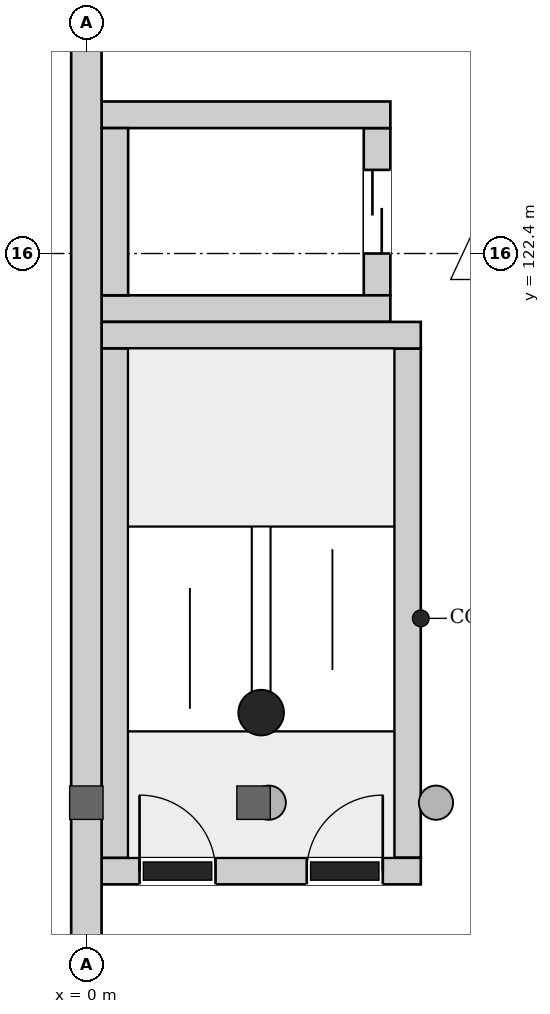
"""IFC4 building model, lengths in metres.
Left out: names, types, materials, properties, quantities, classifications, styles, units other than length and angle.
Written with IfcOpenShell. Run it as: python <this file> out.ifc"""

import sys

from ifc_helpers import new_model, si_unit, direction, frame, frame_2d, origin, place, context, subcontext, project, spatial, rectangle, extrude, element, fill, save


model = new_model("IFC4")
c1 = context("Model", 3, precision=1e-05, world=origin(), true_north=direction((0.0, 1.0)))
c2 = subcontext(c1, "Body", "Model", "MODEL_VIEW")
j1 = project(units=[si_unit("LENGTHUNIT", "METRE"), si_unit("PLANEANGLEUNIT", "RADIAN")], contexts=[c1])
p1 = place(None, origin())
s1 = spatial("IfcSite", under=j1, at=p1, CompositionType="ELEMENT")
p2 = place(p1, origin())
s2 = spatial("IfcBuilding", under=s1, at=p2, CompositionType="ELEMENT")
p3 = place(p2, frame((0.0, 0.0, 26.7)))
s3 = spatial("IfcBuildingStorey", under=s2, at=p3, CompositionType="ELEMENT", Elevation=26.7)
p4 = place(p3, frame((0.0, 94.12, 0.0), z_axis=(0.0, 0.0, 1.0), x_axis=(0.0, 1.0, 0.0)))
e1 = element("IfcWall", 1, at=p4, inside=s3, PredefinedType="SHEAR", context=c2, shape_type="SweptSolid", body=[
    extrude(rectangle(XDim=46.88, YDim=0.4, at=frame_2d((23.44, 0.0))), origin(), (0.0, 0.0, 1.0), 5.2),
])
p5 = place(p3, frame((0.2, 114.275, 0.0), z_axis=(0.0, 0.0, 1.0), x_axis=(1.0, 0.0, 0.0)))
e2 = element("IfcWall", 2, at=p5, inside=s3, PredefinedType="SHEAR", context=c2, shape_type="SweptSolid", body=[
    extrude(rectangle(XDim=4.2, YDim=0.35, at=frame_2d((2.1, 0.0))), origin(), (0.0, 0.0, 1.0), 5.2),
])
p6 = place(p5, frame((0.5, 0.0, 0.0)))
e3 = element("IfcOpeningElement", 3, at=p6, cuts=e2, PredefinedType="OPENING", context=c2, shape_type="SweptSolid", body=[
    extrude(rectangle(XDim=1.0, YDim=2.1, at=frame_2d((0.5, 1.05))), frame((0.0, 0.185, 0.0), z_axis=(0.0, -1.0, 0.0), x_axis=(1.0, 0.0, 0.0)), (0.0, 0.0, 1.0), 0.37),
])
p7 = place(p5, frame((2.7, 0.0, 0.0)))
e4 = element("IfcOpeningElement", 4, at=p7, cuts=e2, PredefinedType="OPENING", context=c2, shape_type="SweptSolid", body=[
    extrude(rectangle(XDim=1.0, YDim=2.1, at=frame_2d((0.5, 1.05))), frame((0.0, 0.185, 0.0), z_axis=(0.0, -1.0, 0.0), x_axis=(1.0, 0.0, 0.0)), (0.0, 0.0, 1.0), 0.37),
])
p8 = place(p3, frame((0.2, 121.325, 0.0), z_axis=(0.0, 0.0, 1.0), x_axis=(1.0, 0.0, 0.0)))
e5 = element("IfcWall", 5, at=p8, inside=s3, PredefinedType="SHEAR", context=c2, shape_type="SweptSolid", body=[
    extrude(rectangle(XDim=4.2, YDim=0.35, at=frame_2d((2.1, 0.0))), origin(), (0.0, 0.0, 1.0), 5.2),
])
for number, where, z_axis, x_axis in (
    (6, (0.375, 114.45, 0.0), (0.0, 0.0, 1.0), (0.0, 1.0, 0.0)),
    (7, (4.225, 114.45, 0.0), (0.0, 0.0, 1.0), (0.0, 1.0, 0.0)),
):
    element("IfcWall", number, at=place(p3, frame(where, z_axis=z_axis, x_axis=x_axis)), inside=s3, PredefinedType="SHEAR", context=c2, shape_type="SweptSolid", body=[
        extrude(rectangle(XDim=6.7, YDim=0.35, at=frame_2d((3.35, 0.0))), origin(), (0.0, 0.0, 1.0), 5.2),
    ])
for number, where, z_axis, x_axis in (
    (8, (0.2, 121.675, 0.0), (0.0, 0.0, 1.0), (1.0, 0.0, 0.0)),
    (9, (0.2, 124.225, 0.0), (0.0, 0.0, 1.0), (1.0, 0.0, 0.0)),
):
    element("IfcWall", number, at=place(p3, frame(where, z_axis=z_axis, x_axis=x_axis)), inside=s3, PredefinedType="SHEAR", context=c2, shape_type="SweptSolid", body=[
        extrude(rectangle(XDim=3.8, YDim=0.35, at=frame_2d((1.9, 0.0))), origin(), (0.0, 0.0, 1.0), 5.2),
    ])
p9 = place(p3, frame((0.375, 121.85, 0.0), z_axis=(0.0, 0.0, 1.0), x_axis=(0.0, 1.0, 0.0)))
e10 = element("IfcWall", 10, at=p9, inside=s3, PredefinedType="SHEAR", context=c2, shape_type="SweptSolid", body=[
    extrude(rectangle(XDim=2.2, YDim=0.35, at=frame_2d((1.1, 0.0))), origin(), (0.0, 0.0, 1.0), 5.2),
])
p10 = place(p3, frame((3.825, 121.85, 0.0), z_axis=(0.0, 0.0, 1.0), x_axis=(0.0, 1.0, 0.0)))
e11 = element("IfcWall", 11, at=p10, inside=s3, PredefinedType="SHEAR", context=c2, shape_type="SweptSolid", body=[
    extrude(rectangle(XDim=2.2, YDim=0.35, at=frame_2d((1.1, 0.0))), origin(), (0.0, 0.0, 1.0), 5.2),
])
p11 = place(p10, frame((0.55, 0.0, 0.0)))
e12 = element("IfcOpeningElement", 12, at=p11, cuts=e11, PredefinedType="OPENING", context=c2, shape_type="SweptSolid", body=[
    extrude(rectangle(XDim=1.1, YDim=2.1, at=frame_2d((0.55, 1.05))), frame((0.0, 0.185, 0.0), z_axis=(0.0, -1.0, 0.0), x_axis=(1.0, 0.0, 0.0)), (0.0, 0.0, 1.0), 0.37),
])
p12 = place(p6, origin())
e13 = element("IfcDoor", 13, at=p12, inside=s3, OperationType="SINGLE_SWING_RIGHT", PredefinedType="DOOR", context=c2, shape_type="SweptSolid", body=[
    extrude(rectangle(XDim=1.0, YDim=2.1, at=frame_2d((0.5, 1.05))), frame((0.0, 0.025, 0.0), z_axis=(0.0, -1.0, 0.0), x_axis=(1.0, 0.0, 0.0)), (0.0, 0.0, 1.0), 0.05),
])
fill(e3, e13)
p13 = place(p7, origin())
e14 = element("IfcDoor", 14, at=p13, inside=s3, OperationType="SINGLE_SWING_LEFT", PredefinedType="DOOR", context=c2, shape_type="SweptSolid", body=[
    extrude(rectangle(XDim=1.0, YDim=2.1, at=frame_2d((0.5, 1.05))), frame((0.0, 0.025, 0.0), z_axis=(0.0, -1.0, 0.0), x_axis=(1.0, 0.0, 0.0)), (0.0, 0.0, 1.0), 0.05),
])
fill(e4, e14)
p14 = place(p11, origin())
e15 = element("IfcDoor", 15, at=p14, inside=s3, OperationType="DOUBLE_DOOR_SLIDING", PredefinedType="DOOR", context=c2, shape_type="SweptSolid", body=[
    extrude(rectangle(XDim=1.1, YDim=2.1, at=frame_2d((0.55, 1.05))), frame((0.0, 0.025, 0.0), z_axis=(0.0, -1.0, 0.0), x_axis=(1.0, 0.0, 0.0)), (0.0, 0.0, 1.0), 0.05),
])
fill(e12, e15)
save(model, sys.argv[1])
